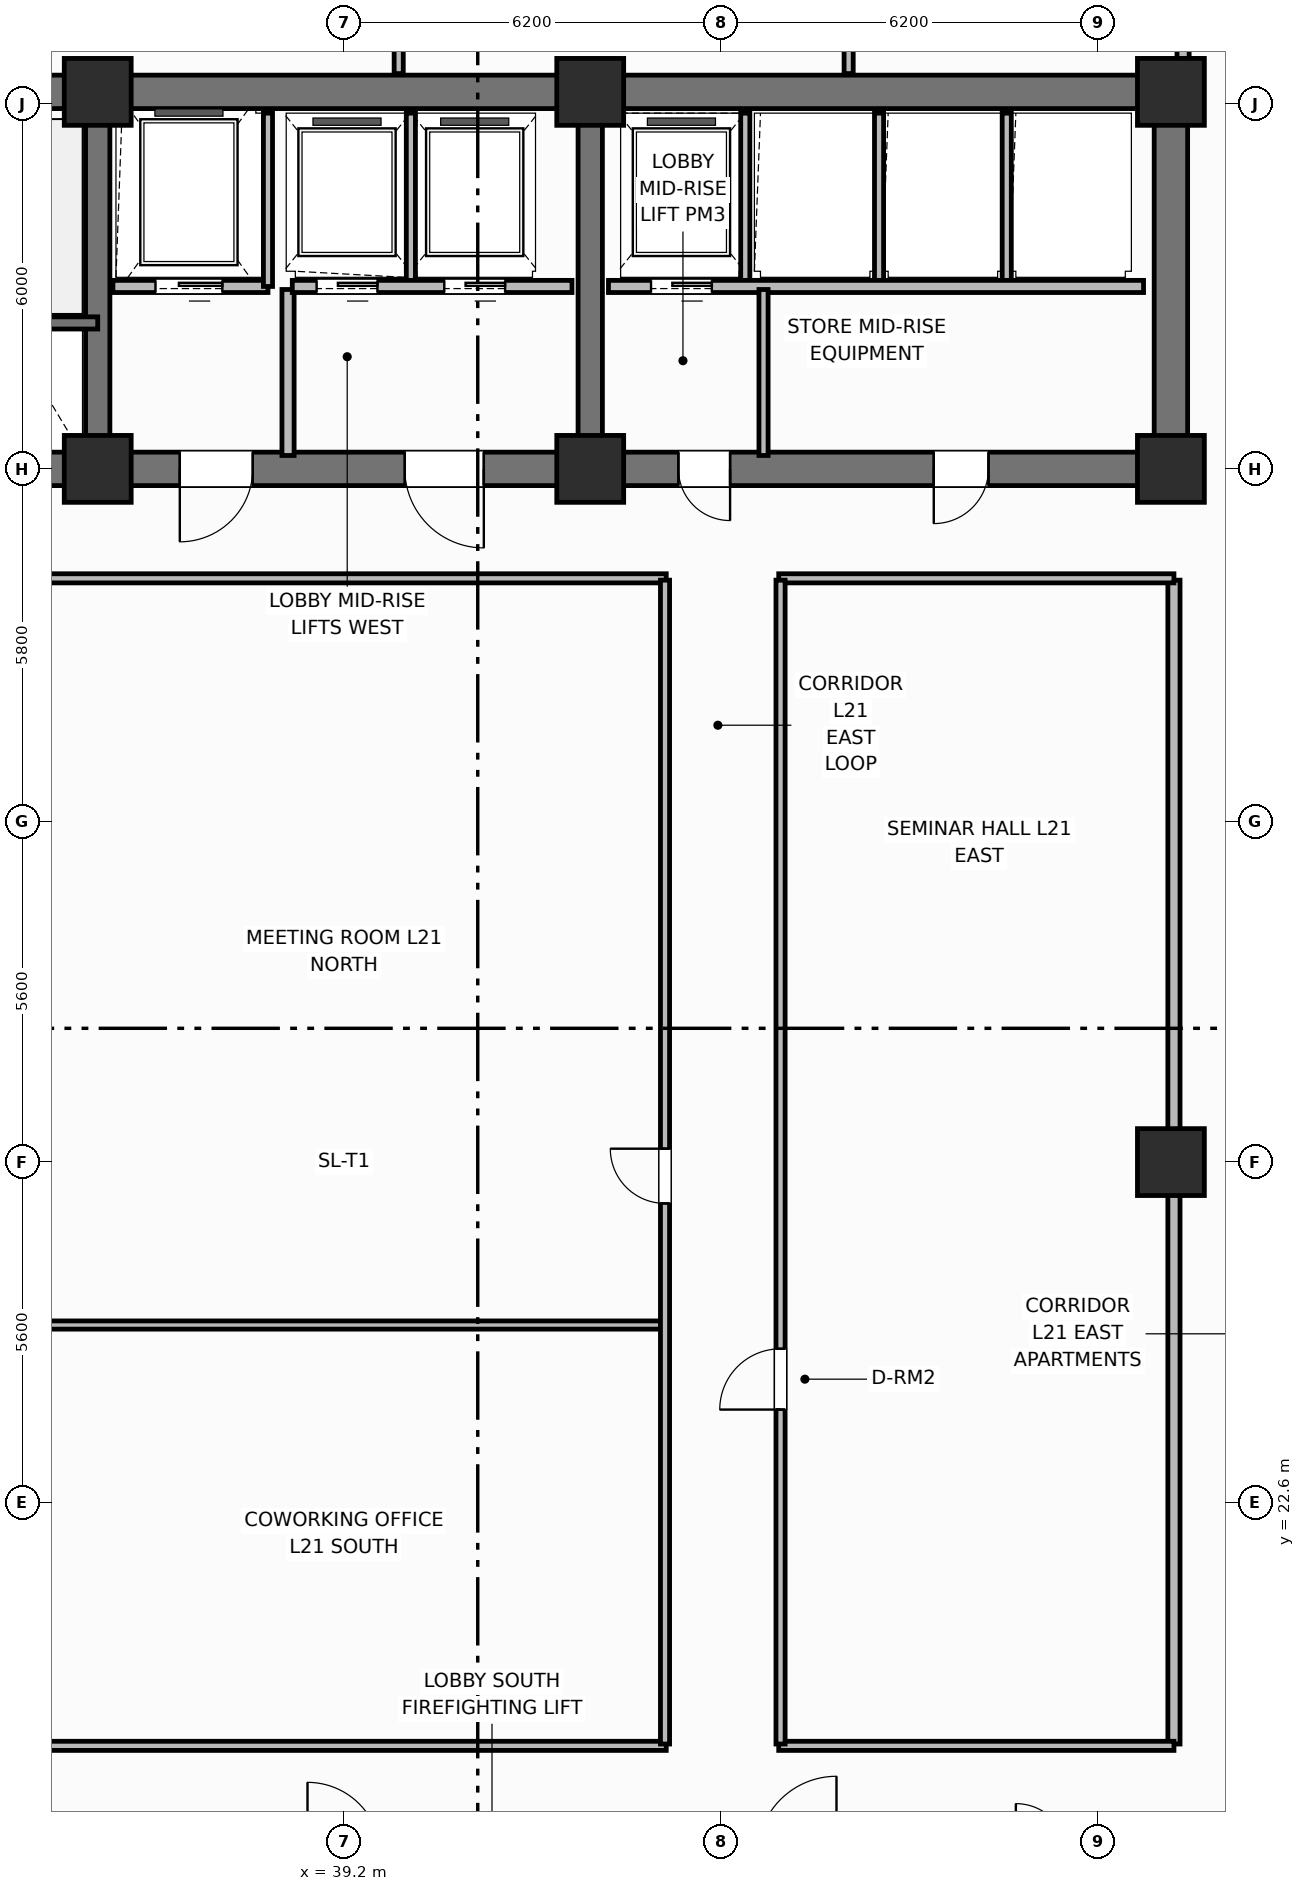
"""IFC4 building model, lengths in metres.
Left out: names, types, materials, properties, quantities, classifications, styles, units other than length and angle.
Written with IfcOpenShell. Run it as: python <this file> out.ifc"""

import sys

from ifc_helpers import new_model, si_unit, direction, frame, frame_2d, origin, origin_2d, place, context, subcontext, project, spatial, rectangle, extrude, element, fill, save


model = new_model("IFC4")
c1 = context("Model", 3, precision=1e-05, world=origin(), true_north=direction((0.0, 1.0)))
c2 = subcontext(c1, "Body", "Model", "MODEL_VIEW")
j1 = project(units=[si_unit("LENGTHUNIT", "METRE"), si_unit("PLANEANGLEUNIT", "RADIAN")], contexts=[c1])
p1 = place(None, origin())
s1 = spatial("IfcSite", under=j1, at=p1, CompositionType="ELEMENT")
p2 = place(p1, origin())
s2 = spatial("IfcBuilding", under=s1, at=p2, CompositionType="ELEMENT")
p3 = place(p2, frame((0.0, 0.0, 88.3)))
s3 = spatial("IfcBuildingStorey", under=s2, at=p3, CompositionType="ELEMENT", Elevation=88.3)
p4 = place(p3, frame((25.6, 45.8, 0.0), z_axis=(0.0, 0.0, 1.0), x_axis=(1.0, 0.0, 0.0)))
e1 = element("IfcWall", 1, at=p4, inside=s3, PredefinedType="SHEAR", context=c2, shape_type="SweptSolid", body=[
    extrude(rectangle(XDim=27.2, YDim=0.55, at=frame_2d((13.6, 0.0))), origin(), (0.0, 0.0, 1.0), 3.7),
])
p5 = place(p3, frame((52.8, 39.875, 0.0), z_axis=(0.0, 0.0, 1.0), x_axis=(0.0, 1.0, 0.0)))
e2 = element("IfcWall", 2, at=p5, inside=s3, PredefinedType="SHEAR", context=c2, shape_type="SweptSolid", body=[
    extrude(rectangle(XDim=5.65, YDim=0.55, at=frame_2d((2.825, 0.0))), origin(), (0.0, 0.0, 1.0), 3.7),
])
p6 = place(p3, frame((52.8, 39.6, 0.0), z_axis=(0.0, 0.0, 1.0), x_axis=(-1.0, 0.0, 0.0)))
e3 = element("IfcWall", 3, at=p6, inside=s3, PredefinedType="SHEAR", context=c2, shape_type="SweptSolid", body=[
    extrude(rectangle(XDim=27.2, YDim=0.55, at=frame_2d((13.6, 0.0))), origin(), (0.0, 0.0, 1.0), 3.7),
])
p7 = place(p6, frame((24.2, 0.0, 0.0)))
e4 = element("IfcOpeningElement", 4, at=p7, cuts=e3, PredefinedType="OPENING", context=c2, shape_type="SweptSolid", body=[
    extrude(rectangle(XDim=1.1, YDim=2.15, at=frame_2d((0.55, 1.075))), frame((0.0, 0.285, 0.0), z_axis=(0.0, -1.0, 0.0), x_axis=(1.0, 0.0, 0.0)), (0.0, 0.0, 1.0), 0.57),
])
p8 = place(p6, frame((15.1, 0.0, 0.0)))
e5 = element("IfcOpeningElement", 5, at=p8, cuts=e3, PredefinedType="OPENING", context=c2, shape_type="SweptSolid", body=[
    extrude(rectangle(XDim=1.2, YDim=2.15, at=frame_2d((0.6, 1.075))), frame((0.0, 0.285, 0.0), z_axis=(0.0, -1.0, 0.0), x_axis=(1.0, 0.0, 0.0)), (0.0, 0.0, 1.0), 0.57),
])
p9 = place(p6, frame((11.3, 0.0, 0.0)))
e6 = element("IfcOpeningElement", 6, at=p9, cuts=e3, PredefinedType="OPENING", context=c2, shape_type="SweptSolid", body=[
    extrude(rectangle(XDim=1.3, YDim=2.2, at=frame_2d((0.65, 1.1))), frame((0.0, 0.285, 0.0), z_axis=(0.0, -1.0, 0.0), x_axis=(1.0, 0.0, 0.0)), (0.0, 0.0, 1.0), 0.57),
])
p10 = place(p6, frame((7.25, 0.0, 0.0)))
e7 = element("IfcOpeningElement", 7, at=p10, cuts=e3, PredefinedType="OPENING", context=c2, shape_type="SweptSolid", body=[
    extrude(rectangle(XDim=0.85, YDim=2.1, at=frame_2d((0.425, 1.05))), frame((0.0, 0.285, 0.0), z_axis=(0.0, -1.0, 0.0), x_axis=(1.0, 0.0, 0.0)), (0.0, 0.0, 1.0), 0.57),
])
p11 = place(p6, frame((3.0, 0.0, 0.0)))
e8 = element("IfcOpeningElement", 8, at=p11, cuts=e3, PredefinedType="OPENING", context=c2, shape_type="SweptSolid", body=[
    extrude(rectangle(XDim=0.9, YDim=2.1, at=frame_2d((0.45, 1.05))), frame((0.0, 0.285, 0.0), z_axis=(0.0, -1.0, 0.0), x_axis=(1.0, 0.0, 0.0)), (0.0, 0.0, 1.0), 0.57),
])
for number, where, z_axis, x_axis in (
    (9, (35.15, 39.875, 0.0), (0.0, 0.0, 1.0), (0.0, 1.0, 0.0)),
    (10, (43.25, 39.875, 0.0), (0.0, 0.0, 1.0), (0.0, 1.0, 0.0)),
):
    element("IfcWall", number, at=place(p3, frame(where, z_axis=z_axis, x_axis=x_axis)), inside=s3, PredefinedType="SHEAR", context=c2, shape_type="SweptSolid", body=[
        extrude(rectangle(XDim=5.65, YDim=0.4, at=frame_2d((2.825, 0.0))), origin(), (0.0, 0.0, 1.0), 3.7),
    ])
for number, where, z_axis, x_axis in (
    (11, (35.15, 39.6, 0.0), (0.0, 0.0, 1.0), (1.0, 0.0, 0.0)),
    (12, (35.15, 45.8, 0.0), (0.0, 0.0, 1.0), (1.0, 0.0, 0.0)),
    (13, (43.25, 39.6, 0.0), (0.0, 0.0, 1.0), (1.0, 0.0, 0.0)),
    (14, (43.25, 45.8, 0.0), (0.0, 0.0, 1.0), (1.0, 0.0, 0.0)),
    (15, (52.8, 39.6, 0.0), (0.0, 0.0, 1.0), (1.0, 0.0, 0.0)),
    (16, (52.8, 45.8, 0.0), (0.0, 0.0, 1.0), (1.0, 0.0, 0.0)),
    (17, (52.8, 28.2, 0.0), (0.0, 0.0, 1.0), (1.0, 0.0, 0.0)),
):
    element("IfcColumn", number, at=place(p3, frame(where, z_axis=z_axis, x_axis=x_axis)), inside=s3, PredefinedType="COLUMN", context=c2, shape_type="SweptSolid", body=[
        extrude(rectangle(XDim=1.1, YDim=1.1, at=origin_2d()), origin(), (0.0, 0.0, 1.0), 3.7),
    ])
p12 = place(p3, frame((35.15, 42.0, 0.0), z_axis=(0.0, 0.0, 1.0), x_axis=(-1.0, 0.0, 0.0)))
e18 = element("IfcWall", 18, at=p12, inside=s3, PredefinedType="SHEAR", context=c2, shape_type="SweptSolid", body=[
    extrude(rectangle(XDim=9.55, YDim=0.2, at=frame_2d((4.775, 0.0))), origin(), (0.0, 0.0, 1.0), 3.7),
])
p13 = place(p12, frame((7.25, 0.0, 0.0)))
e19 = element("IfcOpeningElement", 19, at=p13, cuts=e18, PredefinedType="OPENING", context=c2, shape_type="SweptSolid", body=[
    extrude(rectangle(XDim=1.1, YDim=2.15, at=frame_2d((0.55, 1.075))), frame((0.0, 0.11, 0.0), z_axis=(0.0, -1.0, 0.0), x_axis=(1.0, 0.0, 0.0)), (0.0, 0.0, 1.0), 0.22),
])
p14 = place(p3, frame((37.95, 42.6, 0.0), z_axis=(0.0, 0.0, 1.0), x_axis=(-1.0, 0.0, 0.0)))
e20 = element("IfcWall", 20, at=p14, inside=s3, PredefinedType="PARTITIONING", context=c2, shape_type="SweptSolid", body=[
    extrude(rectangle(XDim=2.55, YDim=0.2, at=frame_2d((1.275, 0.0))), origin(), (0.0, 0.0, 1.0), 2.3),
])
p15 = place(p14, frame((0.75, 0.0, 0.0)))
e21 = element("IfcOpeningElement", 21, at=p15, cuts=e20, PredefinedType="OPENING", context=c2, shape_type="SweptSolid", body=[
    extrude(rectangle(XDim=1.1, YDim=2.15, at=frame_2d((0.55, 1.075))), frame((0.0, 0.11, 0.0), z_axis=(0.0, -1.0, 0.0), x_axis=(1.0, 0.0, 0.0)), (0.0, 0.0, 1.0), 0.22),
])
p16 = place(p3, frame((37.95, 42.6, 0.0), z_axis=(0.0, 0.0, 1.0), x_axis=(0.0, 1.0, 0.0)))
e22 = element("IfcWall", 22, at=p16, inside=s3, PredefinedType="PARTITIONING", context=c2, shape_type="SweptSolid", body=[
    extrude(rectangle(XDim=2.85, YDim=0.15, at=frame_2d((1.425, 0.0))), origin(), (0.0, 0.0, 1.0), 2.53),
])
p17 = place(p3, frame((38.28, 39.82, 0.0), z_axis=(0.0, 0.0, 1.0), x_axis=(0.0, 1.0, 0.0)))
e23 = element("IfcWall", 23, at=p17, inside=s3, PredefinedType="PARTITIONING", context=c2, shape_type="SweptSolid", body=[
    extrude(rectangle(XDim=2.73, YDim=0.2, at=frame_2d((1.365, 0.0))), origin(), (0.0, 0.0, 1.0), 2.53),
])
p18 = place(p3, frame((40.3, 42.65, 0.0), z_axis=(0.0, 0.0, 1.0), x_axis=(0.0, 1.0, 0.0)))
e24 = element("IfcWall", 24, at=p18, inside=s3, PredefinedType="PARTITIONING", context=c2, shape_type="SweptSolid", body=[
    extrude(rectangle(XDim=2.8, YDim=0.15, at=frame_2d((1.4, 0.0))), origin(), (0.0, 0.0, 1.0), 2.53),
])
p19 = place(p3, frame((42.95, 42.6, 0.0), z_axis=(0.0, 0.0, 1.0), x_axis=(-1.0, 0.0, 0.0)))
e25 = element("IfcWall", 25, at=p19, inside=s3, PredefinedType="PARTITIONING", context=c2, shape_type="SweptSolid", body=[
    extrude(rectangle(XDim=4.6, YDim=0.2, at=frame_2d((2.3, 0.0))), origin(), (0.0, 0.0, 1.0), 2.3),
])
p20 = place(p19, frame((3.2, 0.0, 0.0)))
e26 = element("IfcOpeningElement", 26, at=p20, cuts=e25, PredefinedType="OPENING", context=c2, shape_type="SweptSolid", body=[
    extrude(rectangle(XDim=1.0, YDim=2.15, at=frame_2d((0.5, 1.075))), frame((0.0, 0.11, 0.0), z_axis=(0.0, -1.0, 0.0), x_axis=(1.0, 0.0, 0.0)), (0.0, 0.0, 1.0), 0.22),
])
p21 = place(p19, frame((1.1, 0.0, 0.0)))
e27 = element("IfcOpeningElement", 27, at=p21, cuts=e25, PredefinedType="OPENING", context=c2, shape_type="SweptSolid", body=[
    extrude(rectangle(XDim=1.0, YDim=2.15, at=frame_2d((0.5, 1.075))), frame((0.0, 0.11, 0.0), z_axis=(0.0, -1.0, 0.0), x_axis=(1.0, 0.0, 0.0)), (0.0, 0.0, 1.0), 0.22),
])
for number, where, z_axis, x_axis in (
    (28, (45.8, 42.65, 0.0), (0.0, 0.0, 1.0), (0.0, 1.0, 0.0)),
    (29, (48.0, 42.65, 0.0), (0.0, 0.0, 1.0), (0.0, 1.0, 0.0)),
    (30, (50.1, 42.65, 0.0), (0.0, 0.0, 1.0), (0.0, 1.0, 0.0)),
):
    element("IfcWall", number, at=place(p3, frame(where, z_axis=z_axis, x_axis=x_axis)), inside=s3, PredefinedType="PARTITIONING", context=c2, shape_type="SweptSolid", body=[
        extrude(rectangle(XDim=2.8, YDim=0.15, at=frame_2d((1.4, 0.0))), origin(), (0.0, 0.0, 1.0), 2.53),
    ])
p22 = place(p3, frame((52.35, 42.6, 0.0), z_axis=(0.0, 0.0, 1.0), x_axis=(-1.0, 0.0, 0.0)))
e31 = element("IfcWall", 31, at=p22, inside=s3, PredefinedType="PARTITIONING", context=c2, shape_type="SweptSolid", body=[
    extrude(rectangle(XDim=8.8, YDim=0.2, at=frame_2d((4.4, 0.0))), origin(), (0.0, 0.0, 1.0), 2.53),
])
p23 = place(p22, frame((7.1, 0.0, 0.0)))
e32 = element("IfcOpeningElement", 32, at=p23, cuts=e31, PredefinedType="OPENING", context=c2, shape_type="SweptSolid", body=[
    extrude(rectangle(XDim=1.0, YDim=2.15, at=frame_2d((0.5, 1.075))), frame((0.0, 0.11, 0.0), z_axis=(0.0, -1.0, 0.0), x_axis=(1.0, 0.0, 0.0)), (0.0, 0.0, 1.0), 0.22),
])
p24 = place(p3, frame((46.1, 39.82, 0.0), z_axis=(0.0, 0.0, 1.0), x_axis=(0.0, 1.0, 0.0)))
e33 = element("IfcWall", 33, at=p24, inside=s3, PredefinedType="PARTITIONING", context=c2, shape_type="SweptSolid", body=[
    extrude(rectangle(XDim=2.73, YDim=0.15, at=frame_2d((1.365, 0.0))), origin(), (0.0, 0.0, 1.0), 2.53),
])
p25 = place(p3, frame((52.85, 18.63, 0.0), z_axis=(0.0, 0.0, 1.0), x_axis=(0.0, 1.0, 0.0)))
e34 = element("IfcWall", 34, at=p25, inside=s3, PredefinedType="PARTITIONING", context=c2, shape_type="SweptSolid", body=[
    extrude(rectangle(XDim=19.14, YDim=0.2, at=frame_2d((9.57, 0.0))), origin(), (0.0, 0.0, 1.0), 2.53),
])
for number, where, z_axis, x_axis in (
    (35, (33.9, 18.6, 0.0), (0.0, 0.0, 1.0), (1.0, 0.0, 0.0)),
    (36, (33.9, 37.8, 0.0), (0.0, 0.0, 1.0), (1.0, 0.0, 0.0)),
):
    element("IfcWall", number, at=place(p3, frame(where, z_axis=z_axis, x_axis=x_axis)), inside=s3, PredefinedType="PARTITIONING", context=c2, shape_type="SweptSolid", body=[
        extrude(rectangle(XDim=10.6, YDim=0.15, at=frame_2d((5.3, 0.0))), origin(), (0.0, 0.0, 1.0), 2.53),
    ])
for number, where, z_axis, x_axis in (
    (37, (46.35, 18.6, 0.0), (0.0, 0.0, 1.0), (1.0, 0.0, 0.0)),
    (38, (46.35, 37.8, 0.0), (0.0, 0.0, 1.0), (1.0, 0.0, 0.0)),
):
    element("IfcWall", number, at=place(p3, frame(where, z_axis=z_axis, x_axis=x_axis)), inside=s3, PredefinedType="PARTITIONING", context=c2, shape_type="SweptSolid", body=[
        extrude(rectangle(XDim=6.5, YDim=0.15, at=frame_2d((3.25, 0.0))), origin(), (0.0, 0.0, 1.0), 2.53),
    ])
p26 = place(p3, frame((33.92, 25.521, 0.0), z_axis=(0.0, 0.0, 1.0), x_axis=(1.0, 0.0, 0.0)))
e39 = element("IfcWall", 39, at=p26, inside=s3, PredefinedType="PARTITIONING", context=c2, shape_type="SweptSolid", body=[
    extrude(rectangle(XDim=10.56, YDim=0.135, at=frame_2d((5.28, 0.0))), origin(), (0.0, 0.0, 1.0), 2.53),
])
p27 = place(p3, frame((44.48, 18.63, 0.0), z_axis=(0.0, 0.0, 1.0), x_axis=(0.0, 1.0, 0.0)))
e40 = element("IfcWall", 40, at=p27, inside=s3, PredefinedType="PARTITIONING", context=c2, shape_type="SweptSolid", body=[
    extrude(rectangle(XDim=19.14, YDim=0.15, at=frame_2d((9.57, 0.0))), origin(), (0.0, 0.0, 1.0), 2.53),
])
p28 = place(p27, frame((8.89, 0.0, 0.0)))
e41 = element("IfcOpeningElement", 41, at=p28, cuts=e40, PredefinedType="OPENING", context=c2, shape_type="SweptSolid", body=[
    extrude(rectangle(XDim=0.9, YDim=2.1, at=frame_2d((0.45, 1.05))), frame((0.0, 0.085, 0.0), z_axis=(0.0, -1.0, 0.0), x_axis=(1.0, 0.0, 0.0)), (0.0, 0.0, 1.0), 0.17),
])
p29 = place(p3, frame((46.38, 18.63, 0.0), z_axis=(0.0, 0.0, 1.0), x_axis=(0.0, 1.0, 0.0)))
e42 = element("IfcWall", 42, at=p29, inside=s3, PredefinedType="PARTITIONING", context=c2, shape_type="SweptSolid", body=[
    extrude(rectangle(XDim=19.14, YDim=0.15, at=frame_2d((9.57, 0.0))), origin(), (0.0, 0.0, 1.0), 2.53),
])
p30 = place(p29, frame((5.5, 0.0, 0.0)))
e43 = element("IfcOpeningElement", 43, at=p30, cuts=e42, PredefinedType="OPENING", context=c2, shape_type="SweptSolid", body=[
    extrude(rectangle(XDim=1.0, YDim=2.15, at=frame_2d((0.5, 1.075))), frame((0.0, 0.085, 0.0), z_axis=(0.0, -1.0, 0.0), x_axis=(1.0, 0.0, 0.0)), (0.0, 0.0, 1.0), 0.17),
])
p31 = place(p3, frame((40.1, 46.1, 0.0), z_axis=(0.0, 0.0, 1.0), x_axis=(0.0, 1.0, 0.0)))
e44 = element("IfcWall", 44, at=p31, inside=s3, PredefinedType="PARTITIONING", context=c2, shape_type="SweptSolid", body=[
    extrude(rectangle(XDim=5.33, YDim=0.15, at=frame_2d((2.665, 0.0))), origin(), (0.0, 0.0, 1.0), 2.53),
])
p32 = place(p3, frame((47.5, 46.1, 0.0), z_axis=(0.0, 0.0, 1.0), x_axis=(0.0, 1.0, 0.0)))
e45 = element("IfcWall", 45, at=p32, inside=s3, PredefinedType="PARTITIONING", context=c2, shape_type="SweptSolid", body=[
    extrude(rectangle(XDim=5.33, YDim=0.15, at=frame_2d((2.665, 0.0))), origin(), (0.0, 0.0, 1.0), 2.53),
])
p33 = place(p32, frame((0.85, 0.0, 0.0)))
e46 = element("IfcOpeningElement", 46, at=p33, cuts=e45, PredefinedType="OPENING", context=c2, shape_type="SweptSolid", body=[
    extrude(rectangle(XDim=0.9, YDim=2.1, at=frame_2d((0.45, 1.05))), frame((0.0, 0.085, 0.0), z_axis=(0.0, -1.0, 0.0), x_axis=(1.0, 0.0, 0.0)), (0.0, 0.0, 1.0), 0.17),
])
p34 = place(p3, frame((53.0, 46.1, 0.0), z_axis=(0.0, 0.0, 1.0), x_axis=(0.0, 1.0, 0.0)))
e47 = element("IfcWall", 47, at=p34, inside=s3, PredefinedType="PARTITIONING", context=c2, shape_type="SweptSolid", body=[
    extrude(rectangle(XDim=4.68, YDim=0.2, at=frame_2d((2.34, 0.0))), origin(), (0.0, 0.0, 1.0), 2.53),
])
p35 = place(p34, frame((1.05, 0.0, 0.0)))
e48 = element("IfcOpeningElement", 48, at=p35, cuts=e47, PredefinedType="OPENING", context=c2, shape_type="SweptSolid", body=[
    extrude(rectangle(XDim=0.9, YDim=2.1, at=frame_2d((0.45, 1.05))), frame((0.0, 0.11, 0.0), z_axis=(0.0, -1.0, 0.0), x_axis=(1.0, 0.0, 0.0)), (0.0, 0.0, 1.0), 0.22),
])
p36 = place(p15, origin())
e49 = element("IfcDoor", 49, at=p36, inside=s3, OperationType="SLIDING_TO_LEFT", PredefinedType="DOOR", context=c2, shape_type="SweptSolid", body=[
    extrude(rectangle(XDim=1.1, YDim=2.15, at=frame_2d((0.55, 1.075))), frame((0.0, 0.025, 0.0), z_axis=(0.0, -1.0, 0.0), x_axis=(1.0, 0.0, 0.0)), (0.0, 0.0, 1.0), 0.05),
])
fill(e21, e49)
p37 = place(p20, origin())
e50 = element("IfcDoor", 50, at=p37, inside=s3, OperationType="SLIDING_TO_LEFT", PredefinedType="DOOR", context=c2, shape_type="SweptSolid", body=[
    extrude(rectangle(XDim=1.0, YDim=2.15, at=frame_2d((0.5, 1.075))), frame((0.0, 0.025, 0.0), z_axis=(0.0, -1.0, 0.0), x_axis=(1.0, 0.0, 0.0)), (0.0, 0.0, 1.0), 0.05),
])
fill(e26, e50)
p38 = place(p21, origin())
e51 = element("IfcDoor", 51, at=p38, inside=s3, OperationType="SLIDING_TO_LEFT", PredefinedType="DOOR", context=c2, shape_type="SweptSolid", body=[
    extrude(rectangle(XDim=1.0, YDim=2.15, at=frame_2d((0.5, 1.075))), frame((0.0, 0.025, 0.0), z_axis=(0.0, -1.0, 0.0), x_axis=(1.0, 0.0, 0.0)), (0.0, 0.0, 1.0), 0.05),
])
fill(e27, e51)
p39 = place(p23, origin())
e52 = element("IfcDoor", 52, at=p39, inside=s3, OperationType="SLIDING_TO_LEFT", PredefinedType="DOOR", context=c2, shape_type="SweptSolid", body=[
    extrude(rectangle(XDim=1.0, YDim=2.15, at=frame_2d((0.5, 1.075))), frame((0.0, 0.025, 0.0), z_axis=(0.0, -1.0, 0.0), x_axis=(1.0, 0.0, 0.0)), (0.0, 0.0, 1.0), 0.05),
])
fill(e32, e52)
p40 = place(p28, origin())
e53 = element("IfcDoor", 53, at=p40, inside=s3, OperationType="SINGLE_SWING_RIGHT", PredefinedType="DOOR", context=c2, shape_type="SweptSolid", body=[
    extrude(rectangle(XDim=0.9, YDim=2.1, at=frame_2d((0.45, 1.05))), frame((0.0, 0.025, 0.0), z_axis=(0.0, -1.0, 0.0), x_axis=(1.0, 0.0, 0.0)), (0.0, 0.0, 1.0), 0.05),
])
fill(e41, e53)
p41 = place(p30, origin())
e54 = element("IfcDoor", 54, at=p41, inside=s3, OperationType="SINGLE_SWING_LEFT", PredefinedType="DOOR", context=c2, shape_type="SweptSolid", body=[
    extrude(rectangle(XDim=1.0, YDim=2.15, at=frame_2d((0.5, 1.075))), frame((0.0, 0.025, 0.0), z_axis=(0.0, -1.0, 0.0), x_axis=(1.0, 0.0, 0.0)), (0.0, 0.0, 1.0), 0.05),
])
fill(e43, e54)
p42 = place(p8, origin())
e55 = element("IfcDoor", 55, at=p42, inside=s3, OperationType="SINGLE_SWING_RIGHT", PredefinedType="DOOR", context=c2, shape_type="SweptSolid", body=[
    extrude(rectangle(XDim=1.2, YDim=2.15, at=frame_2d((0.6, 1.075))), frame((0.0, 0.025, 0.0), z_axis=(0.0, -1.0, 0.0), x_axis=(1.0, 0.0, 0.0)), (0.0, 0.0, 1.0), 0.05),
])
fill(e5, e55)
p43 = place(p9, origin())
e56 = element("IfcDoor", 56, at=p43, inside=s3, OperationType="SINGLE_SWING_LEFT", PredefinedType="DOOR", context=c2, shape_type="SweptSolid", body=[
    extrude(rectangle(XDim=1.3, YDim=2.2, at=frame_2d((0.65, 1.1))), frame((0.0, 0.025, 0.0), z_axis=(0.0, -1.0, 0.0), x_axis=(1.0, 0.0, 0.0)), (0.0, 0.0, 1.0), 0.05),
])
fill(e6, e56)
p44 = place(p10, origin())
e57 = element("IfcDoor", 57, at=p44, inside=s3, OperationType="SINGLE_SWING_LEFT", PredefinedType="DOOR", context=c2, shape_type="SweptSolid", body=[
    extrude(rectangle(XDim=0.85, YDim=2.1, at=frame_2d((0.425, 1.05))), frame((0.0, 0.025, 0.0), z_axis=(0.0, -1.0, 0.0), x_axis=(1.0, 0.0, 0.0)), (0.0, 0.0, 1.0), 0.05),
])
fill(e7, e57)
p45 = place(p11, origin())
e58 = element("IfcDoor", 58, at=p45, inside=s3, OperationType="SINGLE_SWING_RIGHT", PredefinedType="DOOR", context=c2, shape_type="SweptSolid", body=[
    extrude(rectangle(XDim=0.9, YDim=2.1, at=frame_2d((0.45, 1.05))), frame((0.0, 0.025, 0.0), z_axis=(0.0, -1.0, 0.0), x_axis=(1.0, 0.0, 0.0)), (0.0, 0.0, 1.0), 0.05),
])
fill(e8, e58)
save(model, sys.argv[1])
